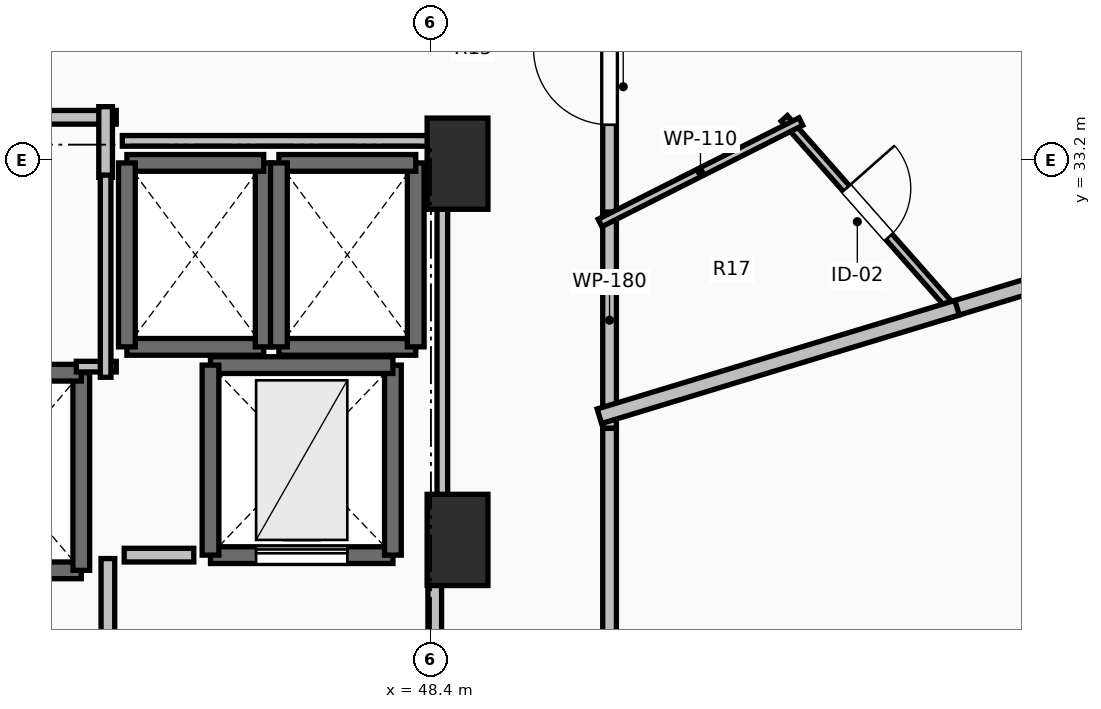
"""IFC4 building model, lengths in metres.
Left out: names, types, materials, properties, quantities, classifications, styles, units other than length and angle.
Written with IfcOpenShell. Run it as: python <this file> out.ifc"""

import sys

from ifc_helpers import new_model, si_unit, direction, frame, frame_2d, origin, origin_2d, place, context, subcontext, project, spatial, rectangle, extrude, element, fill, save


model = new_model("IFC4")
c1 = context("Model", 3, precision=1e-05, world=origin(), true_north=direction((0.0, 1.0)))
c2 = subcontext(c1, "Body", "Model", "MODEL_VIEW")
j1 = project(units=[si_unit("LENGTHUNIT", "METRE"), si_unit("PLANEANGLEUNIT", "RADIAN")], contexts=[c1])
p1 = place(None, origin())
s1 = spatial("IfcSite", under=j1, at=p1, CompositionType="ELEMENT")
p2 = place(p1, origin())
s2 = spatial("IfcBuilding", under=s1, at=p2, CompositionType="ELEMENT")
p3 = place(p2, frame((0.0, 0.0, 113.8)))
s3 = spatial("IfcBuildingStorey", under=s2, at=p3, CompositionType="ELEMENT", Elevation=113.8)
for number, where, z_axis, x_axis in (
    (1, (48.75, 33.15, 0.0), (0.0, 0.0, 1.0), (1.0, 0.0, 0.0)),
    (2, (48.75, 28.2, 0.0), (0.0, 0.0, 1.0), (1.0, 0.0, 0.0)),
):
    element("IfcColumn", number, at=place(p3, frame(where, z_axis=z_axis, x_axis=x_axis)), inside=s3, PredefinedType="PILASTER", context=c2, shape_type="SweptSolid", body=[
        extrude(rectangle(XDim=0.8, YDim=1.2, at=origin_2d()), origin(), (0.0, 0.0, 1.0), 3.5),
    ])
p4 = place(p3, frame((41.6, 27.8, 0.0), z_axis=(0.0, 0.0, 1.0), x_axis=(1.0, 0.0, 0.0)))
e3 = element("IfcWall", 3, at=p4, inside=s3, PredefinedType="SOLIDWALL", context=c2, shape_type="SweptSolid", body=[
    extrude(rectangle(XDim=2.2, YDim=0.22, at=frame_2d((1.1, 0.0))), origin(), (0.0, 0.0, 1.0), 3.24),
])
p5 = place(p3, frame((43.8, 27.8, 0.0), z_axis=(0.0, 0.0, 1.0), x_axis=(0.0, 1.0, 0.0)))
e4 = element("IfcWall", 4, at=p5, inside=s3, PredefinedType="SOLIDWALL", context=c2, shape_type="SweptSolid", body=[
    extrude(rectangle(XDim=2.6, YDim=0.22, at=frame_2d((1.3, 0.0))), origin(), (0.0, 0.0, 1.0), 3.24),
])
p6 = place(p3, frame((43.8, 30.4, 0.0), z_axis=(0.0, 0.0, 1.0), x_axis=(-1.0, 0.0, 0.0)))
e5 = element("IfcWall", 5, at=p6, inside=s3, PredefinedType="SOLIDWALL", context=c2, shape_type="SweptSolid", body=[
    extrude(rectangle(XDim=2.2, YDim=0.22, at=frame_2d((1.1, 0.0))), origin(), (0.0, 0.0, 1.0), 3.24),
])
p7 = place(p3, frame((44.4, 30.74, 0.0), z_axis=(0.0, 0.0, 1.0), x_axis=(1.0, 0.0, 0.0)))
e6 = element("IfcWall", 6, at=p7, inside=s3, PredefinedType="SOLIDWALL", context=c2, shape_type="SweptSolid", body=[
    extrude(rectangle(XDim=1.8, YDim=0.22, at=frame_2d((0.9, 0.0))), origin(), (0.0, 0.0, 1.0), 3.24),
])
p8 = place(p3, frame((46.2, 30.74, 0.0), z_axis=(0.0, 0.0, 1.0), x_axis=(0.0, 1.0, 0.0)))
e7 = element("IfcWall", 7, at=p8, inside=s3, PredefinedType="SOLIDWALL", context=c2, shape_type="SweptSolid", body=[
    extrude(rectangle(XDim=2.42, YDim=0.22, at=frame_2d((1.21, 0.0))), origin(), (0.0, 0.0, 1.0), 3.24),
])
p9 = place(p3, frame((46.2, 33.16, 0.0), z_axis=(0.0, 0.0, 1.0), x_axis=(-1.0, 0.0, 0.0)))
e8 = element("IfcWall", 8, at=p9, inside=s3, PredefinedType="SOLIDWALL", context=c2, shape_type="SweptSolid", body=[
    extrude(rectangle(XDim=1.8, YDim=0.22, at=frame_2d((0.9, 0.0))), origin(), (0.0, 0.0, 1.0), 3.24),
])
p10 = place(p3, frame((44.4, 33.16, 0.0), z_axis=(0.0, 0.0, 1.0), x_axis=(0.0, -1.0, 0.0)))
e9 = element("IfcWall", 9, at=p10, inside=s3, PredefinedType="SOLIDWALL", context=c2, shape_type="SweptSolid", body=[
    extrude(rectangle(XDim=2.42, YDim=0.22, at=frame_2d((1.21, 0.0))), origin(), (0.0, 0.0, 1.0), 3.24),
])
p11 = place(p3, frame((46.4, 30.74, 0.0), z_axis=(0.0, 0.0, 1.0), x_axis=(1.0, 0.0, 0.0)))
e10 = element("IfcWall", 10, at=p11, inside=s3, PredefinedType="SOLIDWALL", context=c2, shape_type="SweptSolid", body=[
    extrude(rectangle(XDim=1.8, YDim=0.22, at=frame_2d((0.9, 0.0))), origin(), (0.0, 0.0, 1.0), 3.24),
])
p12 = place(p3, frame((48.2, 30.74, 0.0), z_axis=(0.0, 0.0, 1.0), x_axis=(0.0, 1.0, 0.0)))
e11 = element("IfcWall", 11, at=p12, inside=s3, PredefinedType="SOLIDWALL", context=c2, shape_type="SweptSolid", body=[
    extrude(rectangle(XDim=2.42, YDim=0.22, at=frame_2d((1.21, 0.0))), origin(), (0.0, 0.0, 1.0), 3.24),
])
p13 = place(p3, frame((48.2, 33.16, 0.0), z_axis=(0.0, 0.0, 1.0), x_axis=(-1.0, 0.0, 0.0)))
e12 = element("IfcWall", 12, at=p13, inside=s3, PredefinedType="SOLIDWALL", context=c2, shape_type="SweptSolid", body=[
    extrude(rectangle(XDim=1.8, YDim=0.22, at=frame_2d((0.9, 0.0))), origin(), (0.0, 0.0, 1.0), 3.24),
])
p14 = place(p3, frame((46.4, 33.16, 0.0), z_axis=(0.0, 0.0, 1.0), x_axis=(0.0, -1.0, 0.0)))
e13 = element("IfcWall", 13, at=p14, inside=s3, PredefinedType="SOLIDWALL", context=c2, shape_type="SweptSolid", body=[
    extrude(rectangle(XDim=2.42, YDim=0.22, at=frame_2d((1.21, 0.0))), origin(), (0.0, 0.0, 1.0), 3.24),
])
p15 = place(p3, frame((45.5, 28.0, 0.0), z_axis=(0.0, 0.0, 1.0), x_axis=(1.0, 0.0, 0.0)))
e14 = element("IfcWall", 14, at=p15, inside=s3, PredefinedType="SHEAR", context=c2, shape_type="SweptSolid", body=[
    extrude(rectangle(XDim=2.4, YDim=0.22, at=frame_2d((1.2, 0.0))), origin(), (0.0, 0.0, 1.0), 3.24),
])
p16 = place(p15, frame((0.6, 0.0, 0.0)))
e15 = element("IfcOpeningElement", 15, at=p16, cuts=e14, PredefinedType="OPENING", context=c2, shape_type="SweptSolid", body=[
    extrude(rectangle(XDim=1.2, YDim=2.2, at=frame_2d((0.6, 1.1))), frame((0.0, 0.125, 0.0), z_axis=(0.0, -1.0, 0.0), x_axis=(1.0, 0.0, 0.0)), (0.0, 0.0, 1.0), 0.25),
])
p17 = place(p3, frame((47.9, 28.0, 0.0), z_axis=(0.0, 0.0, 1.0), x_axis=(0.0, 1.0, 0.0)))
e16 = element("IfcWall", 16, at=p17, inside=s3, PredefinedType="SHEAR", context=c2, shape_type="SweptSolid", body=[
    extrude(rectangle(XDim=2.5, YDim=0.22, at=frame_2d((1.25, 0.0))), origin(), (0.0, 0.0, 1.0), 3.24),
])
p18 = place(p3, frame((47.9, 30.5, 0.0), z_axis=(0.0, 0.0, 1.0), x_axis=(-1.0, 0.0, 0.0)))
e17 = element("IfcWall", 17, at=p18, inside=s3, PredefinedType="SHEAR", context=c2, shape_type="SweptSolid", body=[
    extrude(rectangle(XDim=2.4, YDim=0.22, at=frame_2d((1.2, 0.0))), origin(), (0.0, 0.0, 1.0), 3.24),
])
p19 = place(p3, frame((45.5, 30.5, 0.0), z_axis=(0.0, 0.0, 1.0), x_axis=(0.0, -1.0, 0.0)))
e18 = element("IfcWall", 18, at=p19, inside=s3, PredefinedType="SHEAR", context=c2, shape_type="SweptSolid", body=[
    extrude(rectangle(XDim=2.5, YDim=0.22, at=frame_2d((1.25, 0.0))), origin(), (0.0, 0.0, 1.0), 3.24),
])
p20 = place(p3, frame((44.15, 27.955, 0.0), z_axis=(0.0, 0.0, 1.0), x_axis=(0.0, -1.0, 0.0)))
e19 = element("IfcWall", 19, at=p20, inside=s3, PredefinedType="PARTITIONING", context=c2, shape_type="SweptSolid", body=[
    extrude(rectangle(XDim=3.91, YDim=0.18, at=frame_2d((1.955, 0.0))), origin(), (0.0, 0.0, 1.0), 3.24),
])
p21 = place(p20, frame((1.355, 0.0, 0.0)))
e20 = element("IfcOpeningElement", 20, at=p21, cuts=e19, PredefinedType="OPENING", context=c2, shape_type="SweptSolid", body=[
    extrude(rectangle(XDim=1.2, YDim=2.15, at=frame_2d((0.6, 1.075))), frame((0.0, 0.105, 0.0), z_axis=(0.0, -1.0, 0.0), x_axis=(1.0, 0.0, 0.0)), (0.0, 0.0, 1.0), 0.21),
])
p22 = place(p3, frame((48.45, 23.95, 0.0), z_axis=(0.0, 0.0, 1.0), x_axis=(0.0, 1.0, 0.0)))
e21 = element("IfcWall", 21, at=p22, inside=s3, PredefinedType="PARTITIONING", context=c2, shape_type="SweptSolid", body=[
    extrude(rectangle(XDim=4.05, YDim=0.18, at=frame_2d((2.025, 0.0))), origin(), (0.0, 0.0, 1.0), 3.24),
])
p23 = place(p22, frame((1.425, 0.0, 0.0)))
e22 = element("IfcOpeningElement", 22, at=p23, cuts=e21, PredefinedType="OPENING", context=c2, shape_type="SweptSolid", body=[
    extrude(rectangle(XDim=1.2, YDim=2.15, at=frame_2d((0.6, 1.075))), frame((0.0, 0.105, 0.0), z_axis=(0.0, -1.0, 0.0), x_axis=(1.0, 0.0, 0.0)), (0.0, 0.0, 1.0), 0.21),
])
p24 = place(p3, frame((44.26, 33.76, 0.0), z_axis=(0.0, 0.0, 1.0), x_axis=(-1.0, 0.0, 0.0)))
e23 = element("IfcWall", 23, at=p24, inside=s3, PredefinedType="PARTITIONING", context=c2, shape_type="SweptSolid", body=[
    extrude(rectangle(XDim=3.36, YDim=0.18, at=frame_2d((1.68, 0.0))), origin(), (0.0, 0.0, 1.0), 3.24),
])
p25 = place(p24, frame((1.255, 0.0, 0.0)))
e24 = element("IfcOpeningElement", 24, at=p25, cuts=e23, PredefinedType="OPENING", context=c2, shape_type="SweptSolid", body=[
    extrude(rectangle(XDim=0.85, YDim=2.1, at=frame_2d((0.425, 1.05))), frame((0.0, 0.105, 0.0), z_axis=(0.0, -1.0, 0.0), x_axis=(1.0, 0.0, 0.0)), (0.0, 0.0, 1.0), 0.21),
])
p26 = place(p3, frame((44.12, 32.97, 0.0), z_axis=(0.0, 0.0, 1.0), x_axis=(0.0, 1.0, 0.0)))
e25 = element("IfcWall", 25, at=p26, inside=s3, PredefinedType="PARTITIONING", context=c2, shape_type="SweptSolid", body=[
    extrude(rectangle(XDim=0.93, YDim=0.18, at=frame_2d((0.465, 0.0))), origin(), (0.0, 0.0, 1.0), 3.24),
])
p27 = place(p3, frame((50.75, 32.374, 0.0), z_axis=(0.0, 0.0, 1.0), x_axis=(0.0, 1.0, 0.0)))
e26 = element("IfcWall", 26, at=p27, inside=s3, PredefinedType="PARTITIONING", context=c2, shape_type="SweptSolid", body=[
    extrude(rectangle(XDim=3.576, YDim=0.18, at=frame_2d((1.788, 0.0))), origin(), (0.0, 0.0, 1.0), 2.432),
])
p28 = place(p27, frame((1.288, 0.0, 0.0)))
e27 = element("IfcOpeningElement", 27, at=p28, cuts=e26, PredefinedType="OPENING", context=c2, shape_type="SweptSolid", body=[
    extrude(rectangle(XDim=1.0, YDim=2.15, at=frame_2d((0.5, 1.075))), frame((0.0, 0.105, 0.0), z_axis=(0.0, -1.0, 0.0), x_axis=(1.0, 0.0, 0.0)), (0.0, 0.0, 1.0), 0.21),
])
p29 = place(p3, frame((50.75, 29.668, 0.0), z_axis=(0.0, 0.0, 1.0), x_axis=(0.0, 1.0, 0.0)))
e28 = element("IfcWall", 28, at=p29, inside=s3, PredefinedType="PARTITIONING", context=c2, shape_type="SweptSolid", body=[
    extrude(rectangle(XDim=2.846, YDim=0.18, at=frame_2d((1.423, 0.0))), origin(), (0.0, 0.0, 1.0), 3.24),
])
p30 = place(p3, frame((50.75, 19.385, 0.0), z_axis=(0.0, 0.0, 1.0), x_axis=(0.0, 1.0, 0.0)))
e29 = element("IfcWall", 29, at=p30, inside=s3, PredefinedType="PARTITIONING", context=c2, shape_type="SweptSolid", body=[
    extrude(rectangle(XDim=10.283, YDim=0.18, at=frame_2d((5.142, 0.0))), origin(), (0.0, 0.0, 1.0), 2.432),
])
p31 = place(p30, frame((4.642, 0.0, 0.0)))
e30 = element("IfcOpeningElement", 30, at=p31, cuts=e29, PredefinedType="OPENING", context=c2, shape_type="SweptSolid", body=[
    extrude(rectangle(XDim=1.0, YDim=2.15, at=frame_2d((0.5, 1.075))), frame((0.0, 0.105, 0.0), z_axis=(0.0, -1.0, 0.0), x_axis=(1.0, 0.0, 0.0)), (0.0, 0.0, 1.0), 0.21),
])
p32 = place(p3, frame((53.049, 33.746, 0.0), z_axis=(0.0, 0.0, 1.0), x_axis=(0.662033979608, -0.749473821988, 0.0)))
e31 = element("IfcWall", 31, at=p32, inside=s3, PredefinedType="PARTITIONING", context=c2, shape_type="SweptSolid", body=[
    extrude(rectangle(XDim=3.309, YDim=0.11, at=frame_2d((1.654, 0.0))), origin(), (0.0, 0.0, 1.0), 2.432),
])
p33 = place(p32, frame((1.229, 0.0, 0.0)))
e32 = element("IfcOpeningElement", 32, at=p33, cuts=e31, PredefinedType="OPENING", context=c2, shape_type="SweptSolid", body=[
    extrude(rectangle(XDim=0.85, YDim=2.1, at=frame_2d((0.425, 1.05))), frame((0.0, 0.07, 0.0), z_axis=(0.0, -1.0, 0.0), x_axis=(1.0, 0.0, 0.0)), (0.0, 0.0, 1.0), 0.14),
])
p34 = place(p3, frame((50.625, 32.371, 0.0), z_axis=(0.0, 0.0, 1.0), x_axis=(0.892771184856, 0.450510389992, 0.0)))
e33 = element("IfcWall", 33, at=p34, inside=s3, PredefinedType="PARTITIONING", context=c2, shape_type="SweptSolid", body=[
    extrude(rectangle(XDim=2.959, YDim=0.11, at=frame_2d((1.48, 0.0))), origin(), (0.0, 0.0, 1.0), 2.432),
])
p35 = place(p3, frame((55.188, 31.214, 0.0), z_axis=(0.0, 0.0, 1.0), x_axis=(0.956927603812, 0.290326645457, 0.0)))
e34 = element("IfcWall", 34, at=p35, inside=s3, PredefinedType="PARTITIONING", context=c2, shape_type="SweptSolid", body=[
    extrude(rectangle(XDim=7.471, YDim=0.2, at=frame_2d((3.735, 0.0))), origin(), (0.0, 0.0, 1.0), 2.886),
])
p36 = place(p3, frame((50.616, 29.827, 0.0), z_axis=(0.0, 0.0, 1.0), x_axis=(0.956958408929, 0.290225091232, 0.0)))
e35 = element("IfcWall", 35, at=p36, inside=s3, PredefinedType="PARTITIONING", context=c2, shape_type="SweptSolid", body=[
    extrude(rectangle(XDim=4.918, YDim=0.2, at=frame_2d((2.459, 0.0))), origin(), (0.0, 0.0, 1.0), 2.929),
])
p37 = place(p3, frame((45.28, 28.0, 0.0), z_axis=(0.0, 0.0, 1.0), x_axis=(-1.0, 0.0, 0.0)))
e36 = element("IfcWall", 36, at=p37, inside=s3, PredefinedType="PARTITIONING", context=c2, shape_type="SweptSolid", body=[
    extrude(rectangle(XDim=0.915, YDim=0.18, at=frame_2d((0.458, 0.0))), origin(), (0.0, 0.0, 1.0), 3.24),
])
p38 = place(p3, frame((43.735, 30.48, 0.0), z_axis=(0.0, 0.0, 1.0), x_axis=(1.0, 0.0, 0.0)))
e37 = element("IfcWall", 37, at=p38, inside=s3, PredefinedType="PARTITIONING", context=c2, shape_type="SweptSolid", body=[
    extrude(rectangle(XDim=0.525, YDim=0.14, at=frame_2d((0.262, 0.0))), origin(), (0.0, 0.0, 1.0), 3.24),
])
p39 = place(p3, frame((44.12, 30.34, 0.0), z_axis=(0.0, 0.0, 1.0), x_axis=(0.0, 1.0, 0.0)))
e38 = element("IfcWall", 38, at=p39, inside=s3, PredefinedType="PARTITIONING", context=c2, shape_type="SweptSolid", body=[
    extrude(rectangle(XDim=2.66, YDim=0.14, at=frame_2d((1.33, 0.0))), origin(), (0.0, 0.0, 1.0), 3.24),
])
p40 = place(p3, frame((44.34, 33.45, 0.0), z_axis=(0.0, 0.0, 1.0), x_axis=(1.0, 0.0, 0.0)))
e39 = element("IfcWall", 39, at=p40, inside=s3, PredefinedType="PARTITIONING", context=c2, shape_type="SweptSolid", body=[
    extrude(rectangle(XDim=4.21, YDim=0.14, at=frame_2d((2.105, 0.0))), origin(), (0.0, 0.0, 1.0), 2.432),
])
p41 = place(p3, frame((48.55, 33.45, 0.0), z_axis=(0.0, 0.0, 1.0), x_axis=(0.0, -1.0, 0.0)))
e40 = element("IfcWall", 40, at=p41, inside=s3, PredefinedType="PARTITIONING", context=c2, shape_type="SweptSolid", body=[
    extrude(rectangle(XDim=5.254, YDim=0.14, at=frame_2d((2.627, 0.0))), origin(), (0.0, 0.0, 1.0), 2.432),
])
p42 = place(p16, origin())
e41 = element("IfcDoor", 41, at=p42, inside=s3, OperationType="SLIDING_TO_LEFT", PredefinedType="DOOR", context=c2, shape_type="SweptSolid", body=[
    extrude(rectangle(XDim=1.2, YDim=2.2, at=frame_2d((0.6, 1.1))), frame((0.0, 0.025, 0.0), z_axis=(0.0, -1.0, 0.0), x_axis=(1.0, 0.0, 0.0)), (0.0, 0.0, 1.0), 0.05),
])
fill(e15, e41)
p43 = place(p28, origin())
e42 = element("IfcDoor", 42, at=p43, inside=s3, OperationType="SINGLE_SWING_RIGHT", PredefinedType="DOOR", context=c2, shape_type="SweptSolid", body=[
    extrude(rectangle(XDim=1.0, YDim=2.15, at=frame_2d((0.5, 1.075))), frame((0.0, 0.025, 0.0), z_axis=(0.0, -1.0, 0.0), x_axis=(1.0, 0.0, 0.0)), (0.0, 0.0, 1.0), 0.05),
])
fill(e27, e42)
p44 = place(p33, origin())
e43 = element("IfcDoor", 43, at=p44, inside=s3, OperationType="SINGLE_SWING_LEFT", PredefinedType="DOOR", context=c2, shape_type="SweptSolid", body=[
    extrude(rectangle(XDim=0.85, YDim=2.1, at=frame_2d((0.425, 1.05))), frame((0.0, 0.025, 0.0), z_axis=(0.0, -1.0, 0.0), x_axis=(1.0, 0.0, 0.0)), (0.0, 0.0, 1.0), 0.05),
])
fill(e32, e43)
save(model, sys.argv[1])
